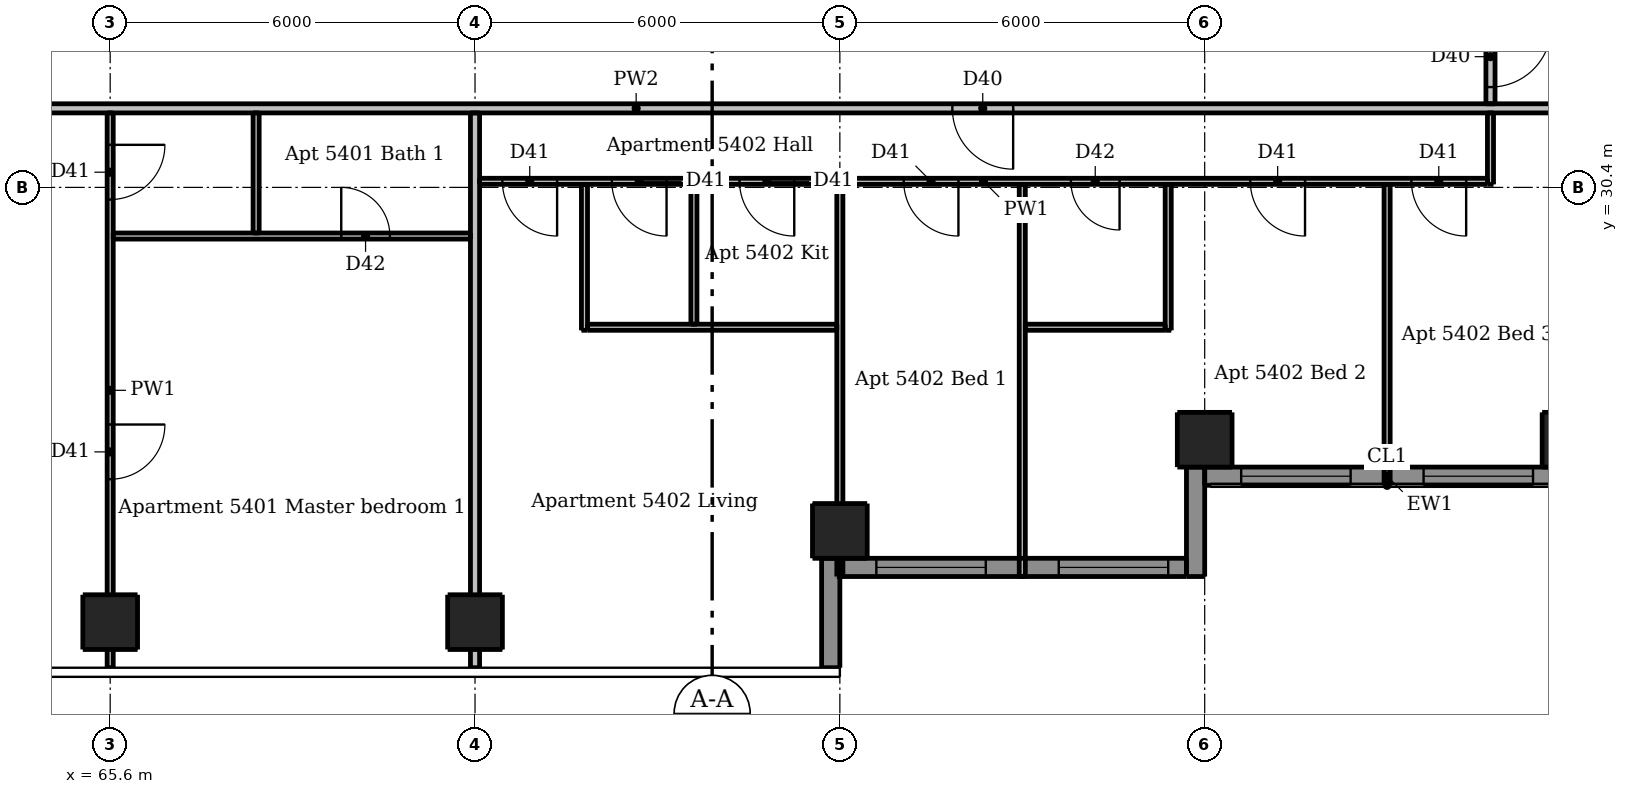
"""IFC4 building model, lengths in metres.
Left out: names, types, materials, properties, quantities, classifications, styles, units other than length and angle.
Written with IfcOpenShell. Run it as: python <this file> out.ifc"""

import sys

from ifc_helpers import new_model, si_unit, direction, frame, frame_2d, origin, origin_2d, place, context, subcontext, project, spatial, rectangle, extrude, element, fill, save


model = new_model("IFC4")
c1 = context("Model", 3, precision=1e-05, world=origin(), true_north=direction((0.0, 1.0)))
c2 = subcontext(c1, "Body", "Model", "MODEL_VIEW")
j1 = project(units=[si_unit("LENGTHUNIT", "METRE"), si_unit("PLANEANGLEUNIT", "RADIAN")], contexts=[c1])
p1 = place(None, origin())
s1 = spatial("IfcSite", under=j1, at=p1, CompositionType="ELEMENT")
p2 = place(p1, origin())
s2 = spatial("IfcBuilding", under=s1, at=p2, CompositionType="ELEMENT")
p3 = place(p2, frame((0.0, 0.0, 203.5)))
s3 = spatial("IfcBuildingStorey", under=s2, at=p3, CompositionType="ELEMENT", Elevation=203.5)
for number, where, z_axis, x_axis in (
    (1, (65.6, 23.25, 0.0), (0.0, 0.0, 1.0), (1.0, 0.0, 0.0)),
    (2, (71.6, 23.25, 0.0), (0.0, 0.0, 1.0), (1.0, 0.0, 0.0)),
    (3, (77.6, 24.75, 0.0), (0.0, 0.0, 1.0), (1.0, 0.0, 0.0)),
    (4, (83.6, 26.25, 0.0), (0.0, 0.0, 1.0), (1.0, 0.0, 0.0)),
    (5, (89.6, 26.25, 0.0), (0.0, 0.0, 1.0), (1.0, 0.0, 0.0)),
):
    element("IfcColumn", number, at=place(p3, frame(where, z_axis=z_axis, x_axis=x_axis)), inside=s3, PredefinedType="COLUMN", context=c2, shape_type="SweptSolid", body=[
        extrude(rectangle(XDim=0.9, YDim=0.9, at=origin_2d()), origin(), (0.0, 0.0, 1.0), 3.05),
    ])
for number, where, z_axis, x_axis in (
    (6, (77.45, 22.5, 0.0), (0.0, 0.0, 1.0), (0.0, 1.0, 0.0)),
    (7, (83.45, 24.0, 0.0), (0.0, 0.0, 1.0), (0.0, 1.0, 0.0)),
):
    element("IfcWall", number, at=place(p3, frame(where, z_axis=z_axis, x_axis=x_axis)), inside=s3, PredefinedType="SOLIDWALL", context=c2, shape_type="SweptSolid", body=[
        extrude(rectangle(XDim=1.8, YDim=0.3, at=frame_2d((0.9, 0.0))), origin(), (0.0, 0.0, 1.0), 3.05),
    ])
p4 = place(p3, frame((77.6, 24.15, 0.0), z_axis=(0.0, 0.0, 1.0), x_axis=(1.0, 0.0, 0.0)))
e8 = element("IfcWall", 8, at=p4, inside=s3, PredefinedType="SOLIDWALL", context=c2, shape_type="SweptSolid", body=[
    extrude(rectangle(XDim=5.7, YDim=0.3, at=frame_2d((2.85, 0.0))), origin(), (0.0, 0.0, 1.0), 3.05),
])
p5 = place(p4, frame((0.6, 0.0, 0.15)))
e9 = element("IfcOpeningElement", 9, at=p5, cuts=e8, PredefinedType="OPENING", context=c2, shape_type="SweptSolid", body=[
    extrude(rectangle(XDim=1.8, YDim=2.1, at=frame_2d((0.9, 1.05))), frame((0.0, 0.16, 0.0), z_axis=(0.0, -1.0, 0.0), x_axis=(1.0, 0.0, 0.0)), (0.0, 0.0, 1.0), 0.32),
])
p6 = place(p4, frame((3.6, 0.0, 0.15)))
e10 = element("IfcOpeningElement", 10, at=p6, cuts=e8, PredefinedType="OPENING", context=c2, shape_type="SweptSolid", body=[
    extrude(rectangle(XDim=1.8, YDim=2.1, at=frame_2d((0.9, 1.05))), frame((0.0, 0.16, 0.0), z_axis=(0.0, -1.0, 0.0), x_axis=(1.0, 0.0, 0.0)), (0.0, 0.0, 1.0), 0.32),
])
p7 = place(p3, frame((83.6, 25.65, 0.0), z_axis=(0.0, 0.0, 1.0), x_axis=(1.0, 0.0, 0.0)))
e11 = element("IfcWall", 11, at=p7, inside=s3, PredefinedType="SOLIDWALL", context=c2, shape_type="SweptSolid", body=[
    extrude(rectangle(XDim=6.0, YDim=0.3, at=frame_2d((3.0, 0.0))), origin(), (0.0, 0.0, 1.0), 3.05),
])
p8 = place(p7, frame((0.6, 0.0, 0.15)))
e12 = element("IfcOpeningElement", 12, at=p8, cuts=e11, PredefinedType="OPENING", context=c2, shape_type="SweptSolid", body=[
    extrude(rectangle(XDim=1.8, YDim=2.1, at=frame_2d((0.9, 1.05))), frame((0.0, 0.16, 0.0), z_axis=(0.0, -1.0, 0.0), x_axis=(1.0, 0.0, 0.0)), (0.0, 0.0, 1.0), 0.32),
])
p9 = place(p7, frame((3.6, 0.0, 0.15)))
e13 = element("IfcOpeningElement", 13, at=p9, cuts=e11, PredefinedType="OPENING", context=c2, shape_type="SweptSolid", body=[
    extrude(rectangle(XDim=1.8, YDim=2.1, at=frame_2d((0.9, 1.05))), frame((0.0, 0.16, 0.0), z_axis=(0.0, -1.0, 0.0), x_axis=(1.0, 0.0, 0.0)), (0.0, 0.0, 1.0), 0.32),
])
p10 = place(p3, frame((65.6, 31.625, 0.0), z_axis=(0.0, 0.0, 1.0), x_axis=(0.0, -1.0, 0.0)))
e14 = element("IfcWall", 14, at=p10, inside=s3, PredefinedType="PARTITIONING", context=c2, shape_type="SweptSolid", body=[
    extrude(rectangle(XDim=9.125, YDim=0.1, at=frame_2d((4.562, 0.0))), origin(), (0.0, 0.0, 1.0), 2.516),
])
p11 = place(p10, frame((0.525, 0.0, 0.0)))
e15 = element("IfcOpeningElement", 15, at=p11, cuts=e14, PredefinedType="OPENING", context=c2, shape_type="SweptSolid", body=[
    extrude(rectangle(XDim=0.9, YDim=2.1, at=frame_2d((0.45, 1.05))), frame((0.0, 0.06, 0.0), z_axis=(0.0, -1.0, 0.0), x_axis=(1.0, 0.0, 0.0)), (0.0, 0.0, 1.0), 0.12),
])
p12 = place(p10, frame((5.125, 0.0, 0.0)))
e16 = element("IfcOpeningElement", 16, at=p12, cuts=e14, PredefinedType="OPENING", context=c2, shape_type="SweptSolid", body=[
    extrude(rectangle(XDim=0.9, YDim=2.1, at=frame_2d((0.45, 1.05))), frame((0.0, 0.06, 0.0), z_axis=(0.0, -1.0, 0.0), x_axis=(1.0, 0.0, 0.0)), (0.0, 0.0, 1.0), 0.12),
])
p13 = place(p3, frame((68.0, 29.65, 0.0), z_axis=(0.0, 0.0, 1.0), x_axis=(0.0, 1.0, 0.0)))
e17 = element("IfcWall", 17, at=p13, inside=s3, PredefinedType="PARTITIONING", context=c2, shape_type="SweptSolid", body=[
    extrude(rectangle(XDim=1.975, YDim=0.1, at=frame_2d((0.988, 0.0))), origin(), (0.0, 0.0, 1.0), 3.05),
])
p14 = place(p3, frame((73.4, 28.05, 0.0), z_axis=(0.0, 0.0, 1.0), x_axis=(0.0, 1.0, 0.0)))
e18 = element("IfcWall", 18, at=p14, inside=s3, PredefinedType="PARTITIONING", context=c2, shape_type="SweptSolid", body=[
    extrude(rectangle(XDim=2.4, YDim=0.1, at=frame_2d((1.2, 0.0))), origin(), (0.0, 0.0, 1.0), 3.05),
])
p15 = place(p3, frame((75.2, 28.15, 0.0), z_axis=(0.0, 0.0, 1.0), x_axis=(0.0, 1.0, 0.0)))
e19 = element("IfcWall", 19, at=p15, inside=s3, PredefinedType="PARTITIONING", context=c2, shape_type="SweptSolid", body=[
    extrude(rectangle(XDim=2.3, YDim=0.1, at=frame_2d((1.15, 0.0))), origin(), (0.0, 0.0, 1.0), 3.05),
])
p16 = place(p3, frame((77.6, 24.0, 0.0), z_axis=(0.0, 0.0, 1.0), x_axis=(0.0, 1.0, 0.0)))
e20 = element("IfcWall", 20, at=p16, inside=s3, PredefinedType="PARTITIONING", context=c2, shape_type="SweptSolid", body=[
    extrude(rectangle(XDim=6.45, YDim=0.1, at=frame_2d((3.225, 0.0))), origin(), (0.0, 0.0, 1.0), 2.59),
])
p17 = place(p3, frame((80.6, 24.0, 0.0), z_axis=(0.0, 0.0, 1.0), x_axis=(0.0, 1.0, 0.0)))
e21 = element("IfcWall", 21, at=p17, inside=s3, PredefinedType="PARTITIONING", context=c2, shape_type="SweptSolid", body=[
    extrude(rectangle(XDim=6.45, YDim=0.1, at=frame_2d((3.225, 0.0))), origin(), (0.0, 0.0, 1.0), 3.05),
])
p18 = place(p3, frame((83.0, 28.05, 0.0), z_axis=(0.0, 0.0, 1.0), x_axis=(0.0, 1.0, 0.0)))
e22 = element("IfcWall", 22, at=p18, inside=s3, PredefinedType="PARTITIONING", context=c2, shape_type="SweptSolid", body=[
    extrude(rectangle(XDim=2.4, YDim=0.1, at=frame_2d((1.2, 0.0))), origin(), (0.0, 0.0, 1.0), 3.05),
])
p19 = place(p3, frame((86.6, 25.5, 0.0), z_axis=(0.0, 0.0, 1.0), x_axis=(0.0, 1.0, 0.0)))
e23 = element("IfcWall", 23, at=p19, inside=s3, PredefinedType="PARTITIONING", context=c2, shape_type="SweptSolid", body=[
    extrude(rectangle(XDim=4.95, YDim=0.1, at=frame_2d((2.475, 0.0))), origin(), (0.0, 0.0, 1.0), 3.05),
])
p20 = place(p3, frame((88.3, 30.45, 0.0), z_axis=(0.0, 0.0, 1.0), x_axis=(0.0, 1.0, 0.0)))
e24 = element("IfcWall", 24, at=p20, inside=s3, PredefinedType="PARTITIONING", context=c2, shape_type="SweptSolid", body=[
    extrude(rectangle(XDim=1.175, YDim=0.1, at=frame_2d((0.587, 0.0))), origin(), (0.0, 0.0, 1.0), 3.05),
])
p21 = place(p3, frame((88.25, 30.5, 0.0), z_axis=(0.0, 0.0, 1.0), x_axis=(-1.0, 0.0, 0.0)))
e25 = element("IfcWall", 25, at=p21, inside=s3, PredefinedType="PARTITIONING", context=c2, shape_type="SweptSolid", body=[
    extrude(rectangle(XDim=16.575, YDim=0.1, at=frame_2d((8.288, 0.0))), origin(), (0.0, 0.0, 1.0), 3.05),
])
p22 = place(p21, frame((15.3, 0.0, 0.0)))
e26 = element("IfcOpeningElement", 26, at=p22, cuts=e25, PredefinedType="OPENING", context=c2, shape_type="SweptSolid", body=[
    extrude(rectangle(XDim=0.9, YDim=2.1, at=frame_2d((0.45, 1.05))), frame((0.0, 0.06, 0.0), z_axis=(0.0, -1.0, 0.0), x_axis=(1.0, 0.0, 0.0)), (0.0, 0.0, 1.0), 0.12),
])
p23 = place(p21, frame((11.4, 0.0, 0.0)))
e27 = element("IfcOpeningElement", 27, at=p23, cuts=e25, PredefinedType="OPENING", context=c2, shape_type="SweptSolid", body=[
    extrude(rectangle(XDim=0.9, YDim=2.1, at=frame_2d((0.45, 1.05))), frame((0.0, 0.06, 0.0), z_axis=(0.0, -1.0, 0.0), x_axis=(1.0, 0.0, 0.0)), (0.0, 0.0, 1.0), 0.12),
])
p24 = place(p21, frame((13.5, 0.0, 0.0)))
e28 = element("IfcOpeningElement", 28, at=p24, cuts=e25, PredefinedType="OPENING", context=c2, shape_type="SweptSolid", body=[
    extrude(rectangle(XDim=0.9, YDim=2.1, at=frame_2d((0.45, 1.05))), frame((0.0, 0.06, 0.0), z_axis=(0.0, -1.0, 0.0), x_axis=(1.0, 0.0, 0.0)), (0.0, 0.0, 1.0), 0.12),
])
p25 = place(p21, frame((8.7, 0.0, 0.0)))
e29 = element("IfcOpeningElement", 29, at=p25, cuts=e25, PredefinedType="OPENING", context=c2, shape_type="SweptSolid", body=[
    extrude(rectangle(XDim=0.9, YDim=2.1, at=frame_2d((0.45, 1.05))), frame((0.0, 0.06, 0.0), z_axis=(0.0, -1.0, 0.0), x_axis=(1.0, 0.0, 0.0)), (0.0, 0.0, 1.0), 0.12),
])
p26 = place(p21, frame((3.0, 0.0, 0.0)))
e30 = element("IfcOpeningElement", 30, at=p26, cuts=e25, PredefinedType="OPENING", context=c2, shape_type="SweptSolid", body=[
    extrude(rectangle(XDim=0.9, YDim=2.1, at=frame_2d((0.45, 1.05))), frame((0.0, 0.06, 0.0), z_axis=(0.0, -1.0, 0.0), x_axis=(1.0, 0.0, 0.0)), (0.0, 0.0, 1.0), 0.12),
])
p27 = place(p21, frame((0.35, 0.0, 0.0)))
e31 = element("IfcOpeningElement", 31, at=p27, cuts=e25, PredefinedType="OPENING", context=c2, shape_type="SweptSolid", body=[
    extrude(rectangle(XDim=0.9, YDim=2.1, at=frame_2d((0.45, 1.05))), frame((0.0, 0.06, 0.0), z_axis=(0.0, -1.0, 0.0), x_axis=(1.0, 0.0, 0.0)), (0.0, 0.0, 1.0), 0.12),
])
p28 = place(p21, frame((6.05, 0.0, 0.0)))
e32 = element("IfcOpeningElement", 32, at=p28, cuts=e25, PredefinedType="OPENING", context=c2, shape_type="SweptSolid", body=[
    extrude(rectangle(XDim=0.8, YDim=2.1, at=frame_2d((0.4, 1.05))), frame((0.0, 0.06, 0.0), z_axis=(0.0, -1.0, 0.0), x_axis=(1.0, 0.0, 0.0)), (0.0, 0.0, 1.0), 0.12),
])
p29 = place(p3, frame((65.65, 29.6, 0.0), z_axis=(0.0, 0.0, 1.0), x_axis=(1.0, 0.0, 0.0)))
e33 = element("IfcWall", 33, at=p29, inside=s3, PredefinedType="PARTITIONING", context=c2, shape_type="SweptSolid", body=[
    extrude(rectangle(XDim=5.875, YDim=0.1, at=frame_2d((2.938, 0.0))), origin(), (0.0, 0.0, 1.0), 3.05),
])
p30 = place(p29, frame((3.75, 0.0, 0.0)))
e34 = element("IfcOpeningElement", 34, at=p30, cuts=e33, PredefinedType="OPENING", context=c2, shape_type="SweptSolid", body=[
    extrude(rectangle(XDim=0.8, YDim=2.1, at=frame_2d((0.4, 1.05))), frame((0.0, 0.06, 0.0), z_axis=(0.0, -1.0, 0.0), x_axis=(1.0, 0.0, 0.0)), (0.0, 0.0, 1.0), 0.12),
])
p31 = place(p3, frame((73.45, 28.1, 0.0), z_axis=(0.0, 0.0, 1.0), x_axis=(1.0, 0.0, 0.0)))
e35 = element("IfcWall", 35, at=p31, inside=s3, PredefinedType="PARTITIONING", context=c2, shape_type="SweptSolid", body=[
    extrude(rectangle(XDim=4.1, YDim=0.1, at=frame_2d((2.05, 0.0))), origin(), (0.0, 0.0, 1.0), 3.05),
])
p32 = place(p3, frame((80.65, 28.1, 0.0), z_axis=(0.0, 0.0, 1.0), x_axis=(1.0, 0.0, 0.0)))
e36 = element("IfcWall", 36, at=p32, inside=s3, PredefinedType="PARTITIONING", context=c2, shape_type="SweptSolid", body=[
    extrude(rectangle(XDim=2.3, YDim=0.1, at=frame_2d((1.15, 0.0))), origin(), (0.0, 0.0, 1.0), 3.05),
])
p33 = place(p3, frame((71.6, 22.5, 0.0), z_axis=(0.0, 0.0, 1.0), x_axis=(0.0, 1.0, 0.0)))
e37 = element("IfcWall", 37, at=p33, inside=s3, PredefinedType="PARTITIONING", context=c2, shape_type="SweptSolid", body=[
    extrude(rectangle(XDim=9.125, YDim=0.15, at=frame_2d((4.562, 0.0))), origin(), (0.0, 0.0, 1.0), 2.516),
])
p34 = place(p3, frame((88.3, 61.175, 0.0), z_axis=(0.0, 0.0, 1.0), x_axis=(0.0, -1.0, 0.0)))
e38 = element("IfcWall", 38, at=p34, inside=s3, PredefinedType="PARTITIONING", context=c2, shape_type="SweptSolid", body=[
    extrude(rectangle(XDim=29.4, YDim=0.15, at=frame_2d((14.7, 0.0))), origin(), (0.0, 0.0, 1.0), 3.05),
])
p35 = place(p34, frame((28.125, 0.0, 0.0)))
e39 = element("IfcOpeningElement", 39, at=p35, cuts=e38, PredefinedType="OPENING", context=c2, shape_type="SweptSolid", body=[
    extrude(rectangle(XDim=1.0, YDim=2.1, at=frame_2d((0.5, 1.05))), frame((0.0, 0.085, 0.0), z_axis=(0.0, -1.0, 0.0), x_axis=(1.0, 0.0, 0.0)), (0.0, 0.0, 1.0), 0.17),
])
p36 = place(p34, frame((10.775, 0.0, 0.0)))
e40 = element("IfcOpeningElement", 40, at=p36, cuts=e38, PredefinedType="OPENING", context=c2, shape_type="SweptSolid", body=[
    extrude(rectangle(XDim=1.0, YDim=2.1, at=frame_2d((0.5, 1.05))), frame((0.0, 0.085, 0.0), z_axis=(0.0, -1.0, 0.0), x_axis=(1.0, 0.0, 0.0)), (0.0, 0.0, 1.0), 0.17),
])
p37 = place(p3, frame((89.525, 31.7, 0.0), z_axis=(0.0, 0.0, 1.0), x_axis=(-1.0, 0.0, 0.0)))
e41 = element("IfcWall", 41, at=p37, inside=s3, PredefinedType="PARTITIONING", context=c2, shape_type="SweptSolid", body=[
    extrude(rectangle(XDim=30.55, YDim=0.15, at=frame_2d((15.275, 0.0))), origin(), (0.0, 0.0, 1.0), 3.05),
])
p38 = place(p37, frame((26.775, 0.0, 0.0)))
e42 = element("IfcOpeningElement", 42, at=p38, cuts=e41, PredefinedType="OPENING", context=c2, shape_type="SweptSolid", body=[
    extrude(rectangle(XDim=1.0, YDim=2.1, at=frame_2d((0.5, 1.05))), frame((0.0, 0.085, 0.0), z_axis=(0.0, -1.0, 0.0), x_axis=(1.0, 0.0, 0.0)), (0.0, 0.0, 1.0), 0.17),
])
p39 = place(p37, frame((9.075, 0.0, 0.0)))
e43 = element("IfcOpeningElement", 43, at=p39, cuts=e41, PredefinedType="OPENING", context=c2, shape_type="SweptSolid", body=[
    extrude(rectangle(XDim=1.0, YDim=2.1, at=frame_2d((0.5, 1.05))), frame((0.0, 0.085, 0.0), z_axis=(0.0, -1.0, 0.0), x_axis=(1.0, 0.0, 0.0)), (0.0, 0.0, 1.0), 0.17),
])
p40 = place(p5, origin())
e44 = element("IfcWindow", 44, at=p40, inside=s3, PartitioningType="DOUBLE_PANEL_VERTICAL", PredefinedType="WINDOW", context=c2, shape_type="SweptSolid", body=[
    extrude(rectangle(XDim=1.8, YDim=2.1, at=frame_2d((0.9, 1.05))), frame((0.0, 0.03, 0.0), z_axis=(0.0, -1.0, 0.0), x_axis=(1.0, 0.0, 0.0)), (0.0, 0.0, 1.0), 0.06),
])
fill(e9, e44)
p41 = place(p6, origin())
e45 = element("IfcWindow", 45, at=p41, inside=s3, PartitioningType="DOUBLE_PANEL_VERTICAL", PredefinedType="WINDOW", context=c2, shape_type="SweptSolid", body=[
    extrude(rectangle(XDim=1.8, YDim=2.1, at=frame_2d((0.9, 1.05))), frame((0.0, 0.03, 0.0), z_axis=(0.0, -1.0, 0.0), x_axis=(1.0, 0.0, 0.0)), (0.0, 0.0, 1.0), 0.06),
])
fill(e10, e45)
p42 = place(p8, origin())
e46 = element("IfcWindow", 46, at=p42, inside=s3, PartitioningType="DOUBLE_PANEL_VERTICAL", PredefinedType="WINDOW", context=c2, shape_type="SweptSolid", body=[
    extrude(rectangle(XDim=1.8, YDim=2.1, at=frame_2d((0.9, 1.05))), frame((0.0, 0.03, 0.0), z_axis=(0.0, -1.0, 0.0), x_axis=(1.0, 0.0, 0.0)), (0.0, 0.0, 1.0), 0.06),
])
fill(e12, e46)
p43 = place(p9, origin())
e47 = element("IfcWindow", 47, at=p43, inside=s3, PartitioningType="DOUBLE_PANEL_VERTICAL", PredefinedType="WINDOW", context=c2, shape_type="SweptSolid", body=[
    extrude(rectangle(XDim=1.8, YDim=2.1, at=frame_2d((0.9, 1.05))), frame((0.0, 0.03, 0.0), z_axis=(0.0, -1.0, 0.0), x_axis=(1.0, 0.0, 0.0)), (0.0, 0.0, 1.0), 0.06),
])
fill(e13, e47)
p44 = place(p11, origin())
e48 = element("IfcDoor", 48, at=p44, inside=s3, OperationType="SINGLE_SWING_LEFT", PredefinedType="DOOR", context=c2, shape_type="SweptSolid", body=[
    extrude(rectangle(XDim=0.9, YDim=2.1, at=frame_2d((0.45, 1.05))), frame((0.0, 0.025, 0.0), z_axis=(0.0, -1.0, 0.0), x_axis=(1.0, 0.0, 0.0)), (0.0, 0.0, 1.0), 0.05),
])
fill(e15, e48)
p45 = place(p12, origin())
e49 = element("IfcDoor", 49, at=p45, inside=s3, OperationType="SINGLE_SWING_LEFT", PredefinedType="DOOR", context=c2, shape_type="SweptSolid", body=[
    extrude(rectangle(XDim=0.9, YDim=2.1, at=frame_2d((0.45, 1.05))), frame((0.0, 0.025, 0.0), z_axis=(0.0, -1.0, 0.0), x_axis=(1.0, 0.0, 0.0)), (0.0, 0.0, 1.0), 0.05),
])
fill(e16, e49)
p46 = place(p30, origin())
e50 = element("IfcDoor", 50, at=p46, inside=s3, OperationType="SINGLE_SWING_LEFT", PredefinedType="DOOR", context=c2, shape_type="SweptSolid", body=[
    extrude(rectangle(XDim=0.8, YDim=2.1, at=frame_2d((0.4, 1.05))), frame((0.0, 0.025, 0.0), z_axis=(0.0, -1.0, 0.0), x_axis=(1.0, 0.0, 0.0)), (0.0, 0.0, 1.0), 0.05),
])
fill(e34, e50)
p47 = place(p39, origin())
e51 = element("IfcDoor", 51, at=p47, inside=s3, OperationType="SINGLE_SWING_LEFT", PredefinedType="DOOR", context=c2, shape_type="SweptSolid", body=[
    extrude(rectangle(XDim=1.0, YDim=2.1, at=frame_2d((0.5, 1.05))), frame((0.0, 0.025, 0.0), z_axis=(0.0, -1.0, 0.0), x_axis=(1.0, 0.0, 0.0)), (0.0, 0.0, 1.0), 0.05),
])
fill(e43, e51)
p48 = place(p22, origin())
e52 = element("IfcDoor", 52, at=p48, inside=s3, OperationType="SINGLE_SWING_LEFT", PredefinedType="DOOR", context=c2, shape_type="SweptSolid", body=[
    extrude(rectangle(XDim=0.9, YDim=2.1, at=frame_2d((0.45, 1.05))), frame((0.0, 0.025, 0.0), z_axis=(0.0, -1.0, 0.0), x_axis=(1.0, 0.0, 0.0)), (0.0, 0.0, 1.0), 0.05),
])
fill(e26, e52)
p49 = place(p23, origin())
e53 = element("IfcDoor", 53, at=p49, inside=s3, OperationType="SINGLE_SWING_LEFT", PredefinedType="DOOR", context=c2, shape_type="SweptSolid", body=[
    extrude(rectangle(XDim=0.9, YDim=2.1, at=frame_2d((0.45, 1.05))), frame((0.0, 0.025, 0.0), z_axis=(0.0, -1.0, 0.0), x_axis=(1.0, 0.0, 0.0)), (0.0, 0.0, 1.0), 0.05),
])
fill(e27, e53)
p50 = place(p24, origin())
e54 = element("IfcDoor", 54, at=p50, inside=s3, OperationType="SINGLE_SWING_LEFT", PredefinedType="DOOR", context=c2, shape_type="SweptSolid", body=[
    extrude(rectangle(XDim=0.9, YDim=2.1, at=frame_2d((0.45, 1.05))), frame((0.0, 0.025, 0.0), z_axis=(0.0, -1.0, 0.0), x_axis=(1.0, 0.0, 0.0)), (0.0, 0.0, 1.0), 0.05),
])
fill(e28, e54)
p51 = place(p25, origin())
e55 = element("IfcDoor", 55, at=p51, inside=s3, OperationType="SINGLE_SWING_LEFT", PredefinedType="DOOR", context=c2, shape_type="SweptSolid", body=[
    extrude(rectangle(XDim=0.9, YDim=2.1, at=frame_2d((0.45, 1.05))), frame((0.0, 0.025, 0.0), z_axis=(0.0, -1.0, 0.0), x_axis=(1.0, 0.0, 0.0)), (0.0, 0.0, 1.0), 0.05),
])
fill(e29, e55)
p52 = place(p26, origin())
e56 = element("IfcDoor", 56, at=p52, inside=s3, OperationType="SINGLE_SWING_LEFT", PredefinedType="DOOR", context=c2, shape_type="SweptSolid", body=[
    extrude(rectangle(XDim=0.9, YDim=2.1, at=frame_2d((0.45, 1.05))), frame((0.0, 0.025, 0.0), z_axis=(0.0, -1.0, 0.0), x_axis=(1.0, 0.0, 0.0)), (0.0, 0.0, 1.0), 0.05),
])
fill(e30, e56)
p53 = place(p27, origin())
e57 = element("IfcDoor", 57, at=p53, inside=s3, OperationType="SINGLE_SWING_LEFT", PredefinedType="DOOR", context=c2, shape_type="SweptSolid", body=[
    extrude(rectangle(XDim=0.9, YDim=2.1, at=frame_2d((0.45, 1.05))), frame((0.0, 0.025, 0.0), z_axis=(0.0, -1.0, 0.0), x_axis=(1.0, 0.0, 0.0)), (0.0, 0.0, 1.0), 0.05),
])
fill(e31, e57)
p54 = place(p28, origin())
e58 = element("IfcDoor", 58, at=p54, inside=s3, OperationType="SINGLE_SWING_LEFT", PredefinedType="DOOR", context=c2, shape_type="SweptSolid", body=[
    extrude(rectangle(XDim=0.8, YDim=2.1, at=frame_2d((0.4, 1.05))), frame((0.0, 0.025, 0.0), z_axis=(0.0, -1.0, 0.0), x_axis=(1.0, 0.0, 0.0)), (0.0, 0.0, 1.0), 0.05),
])
fill(e32, e58)
p55 = place(p35, origin())
e59 = element("IfcDoor", 59, at=p55, inside=s3, OperationType="SINGLE_SWING_LEFT", PredefinedType="DOOR", context=c2, shape_type="SweptSolid", body=[
    extrude(rectangle(XDim=1.0, YDim=2.1, at=frame_2d((0.5, 1.05))), frame((0.0, 0.025, 0.0), z_axis=(0.0, -1.0, 0.0), x_axis=(1.0, 0.0, 0.0)), (0.0, 0.0, 1.0), 0.05),
])
fill(e39, e59)
save(model, sys.argv[1])
